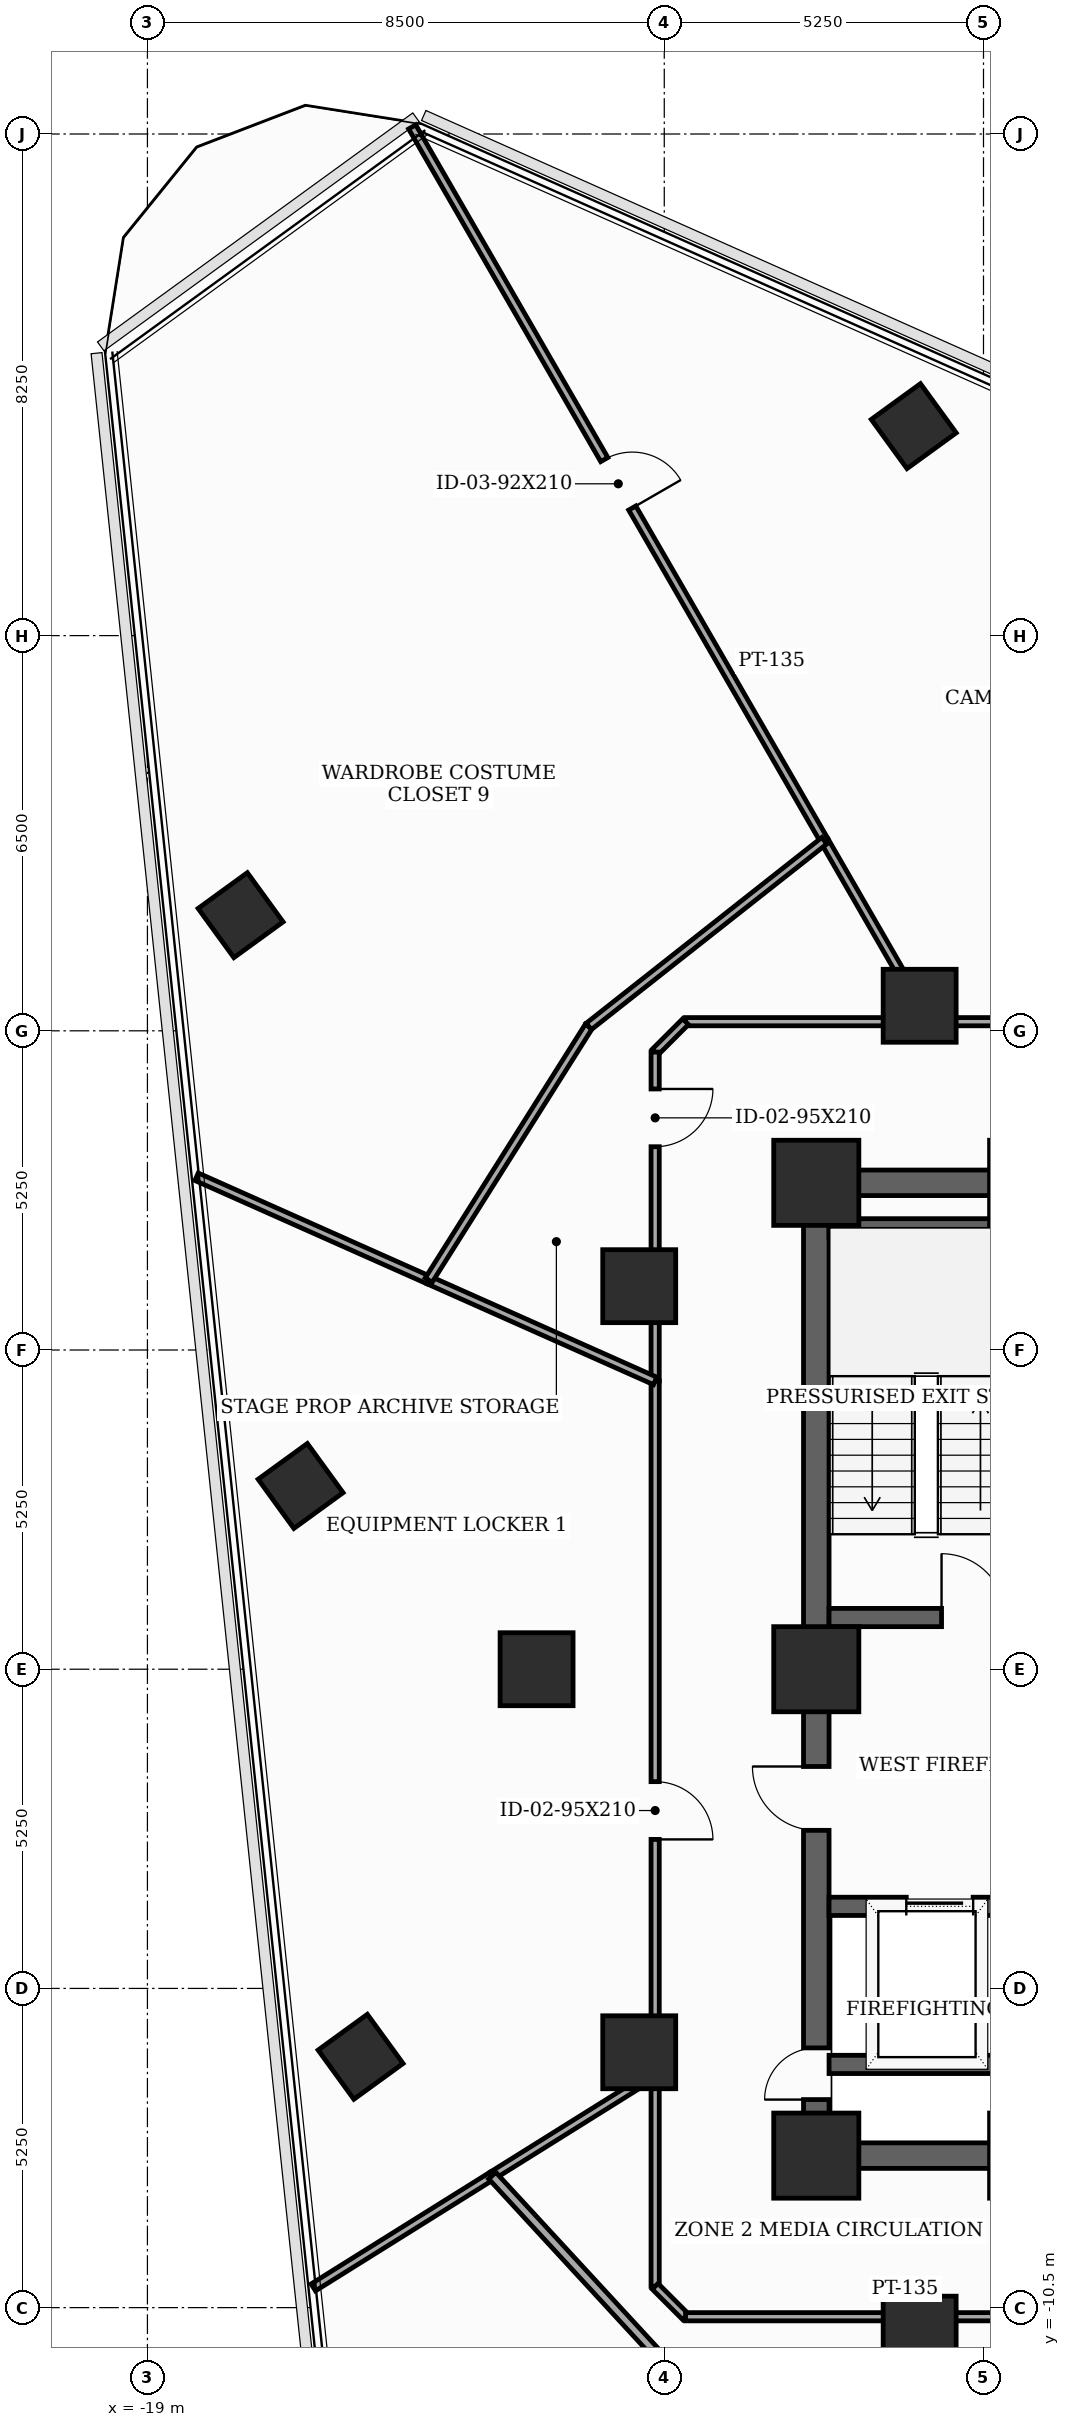
"""IFC4 building model, lengths in metres.
Left out: names, types, materials, properties, quantities, classifications, styles, units other than length and angle.
Written with IfcOpenShell. Run it as: python <this file> out.ifc"""

import sys

from ifc_helpers import new_model, si_unit, direction, frame, frame_2d, origin, origin_2d, place, context, subcontext, project, spatial, rectangle, extrude, element, fill, save


model = new_model("IFC4")
c1 = context("Model", 3, precision=1e-05, world=origin(), true_north=direction((0.0, 1.0)))
c2 = subcontext(c1, "Body", "Model", "MODEL_VIEW")
j1 = project(units=[si_unit("LENGTHUNIT", "METRE"), si_unit("PLANEANGLEUNIT", "RADIAN")], contexts=[c1])
p1 = place(None, origin())
s1 = spatial("IfcSite", under=j1, at=p1, CompositionType="ELEMENT")
p2 = place(p1, origin())
s2 = spatial("IfcBuilding", under=s1, at=p2, CompositionType="ELEMENT")
p3 = place(p2, frame((0.0, 0.0, 154.6)))
s3 = spatial("IfcBuildingStorey", under=s2, at=p3, CompositionType="ELEMENT", Elevation=154.6)
for number, where, z_axis, x_axis in (
    (1, (-8.0, -8.0, 0.0), (0.0, 0.0, 1.0), (1.0, 0.0, 0.0)),
    (2, (-4.45, -8.0, 0.0), (0.0, 0.0, 1.0), (1.0, 0.0, 0.0)),
    (3, (-4.45, 8.0, 0.0), (0.0, 0.0, 1.0), (1.0, 0.0, 0.0)),
    (4, (-8.0, 8.0, 0.0), (0.0, 0.0, 1.0), (1.0, 0.0, 0.0)),
    (5, (-8.0, 0.0, 0.0), (0.0, 0.0, 1.0), (1.0, 0.0, 0.0)),
):
    element("IfcColumn", number, at=place(p3, frame(where, z_axis=z_axis, x_axis=x_axis)), inside=s3, PredefinedType="COLUMN", context=c2, shape_type="SweptSolid", body=[
        extrude(rectangle(XDim=1.4, YDim=1.4, at=origin_2d()), origin(), (0.0, 0.0, 1.0), 3.7),
    ])
for number, where, z_axis, x_axis in (
    (6, (-6.3, 10.912, 0.0), (0.0, 0.0, 1.0), (1.0, 0.0, 0.0)),
    (7, (-10.912, 6.3, 0.0), (0.0, 0.0, 1.0), (1.0, 0.0, 0.0)),
    (8, (-12.6, 0.0, 0.0), (0.0, 0.0, 1.0), (1.0, 0.0, 0.0)),
    (9, (-10.912, -6.3, 0.0), (0.0, 0.0, 1.0), (1.0, 0.0, 0.0)),
    (10, (-6.3, -10.912, 0.0), (0.0, 0.0, 1.0), (1.0, 0.0, 0.0)),
):
    element("IfcColumn", number, at=place(p3, frame(where, z_axis=z_axis, x_axis=x_axis)), inside=s3, PredefinedType="COLUMN", context=c2, shape_type="SweptSolid", body=[
        extrude(rectangle(XDim=1.2, YDim=1.2, at=origin_2d()), origin(), (0.0, 0.0, 1.0), 3.7),
    ])
for number, where, z_axis, x_axis in (
    (11, (-6.397, 20.445, 0.0), (0.0, 0.0, 1.0), (0.809, 0.588, 0.0)),
    (12, (-17.468, 12.402, 0.0), (0.0, 0.0, 1.0), (0.809, 0.588, 0.0)),
    (13, (-16.481, 3.014, 0.0), (0.0, 0.0, 1.0), (0.809, 0.588, 0.0)),
    (14, (-15.494, -6.375, 0.0), (0.0, 0.0, 1.0), (0.809, 0.588, 0.0)),
):
    element("IfcColumn", number, at=place(p3, frame(where, z_axis=z_axis, x_axis=x_axis)), inside=s3, PredefinedType="COLUMN", context=c2, shape_type="SweptSolid", body=[
        extrude(rectangle(XDim=1.0, YDim=1.0, at=origin_2d()), origin(), (0.0, 0.0, 1.0), 3.7),
    ])
p4 = place(p3, frame((-8.0, -8.0, 0.0), z_axis=(0.0, 0.0, 1.0), x_axis=(0.0, 1.0, 0.0)))
e15 = element("IfcWall", 15, at=p4, inside=s3, PredefinedType="SHEAR", context=c2, shape_type="SweptSolid", body=[
    extrude(rectangle(XDim=16.0, YDim=0.42, at=frame_2d((8.0, 0.0))), origin(), (0.0, 0.0, 1.0), 3.5),
])
p5 = place(p4, frame((0.922, 0.0, 0.0)))
e16 = element("IfcOpeningElement", 16, at=p5, cuts=e15, PredefinedType="OPENING", context=c2, shape_type="SweptSolid", body=[
    extrude(rectangle(XDim=0.85, YDim=2.02, at=frame_2d((0.425, 1.01))), frame((0.0, 0.22, 0.0), z_axis=(0.0, -1.0, 0.0), x_axis=(1.0, 0.0, 0.0)), (0.0, 0.0, 1.0), 0.44),
])
p6 = place(p4, frame((5.35, 0.0, 0.0)))
e17 = element("IfcOpeningElement", 17, at=p6, cuts=e15, PredefinedType="OPENING", context=c2, shape_type="SweptSolid", body=[
    extrude(rectangle(XDim=1.05, YDim=2.15, at=frame_2d((0.525, 1.075))), frame((0.0, 0.22, 0.0), z_axis=(0.0, -1.0, 0.0), x_axis=(1.0, 0.0, 0.0)), (0.0, 0.0, 1.0), 0.44),
])
p7 = place(p3, frame((-8.0, -8.0, 0.0), z_axis=(0.0, 0.0, 1.0), x_axis=(1.0, 0.0, 0.0)))
e18 = element("IfcWall", 18, at=p7, inside=s3, PredefinedType="SHEAR", context=c2, shape_type="SweptSolid", body=[
    extrude(rectangle(XDim=16.0, YDim=0.42, at=frame_2d((8.0, 0.0))), origin(), (0.0, 0.0, 1.0), 3.5),
])
p8 = place(p7, frame((7.52, 0.0, 0.0)))
e19 = element("IfcOpeningElement", 19, at=p8, cuts=e18, PredefinedType="OPENING", context=c2, shape_type="SweptSolid", body=[
    extrude(rectangle(XDim=0.95, YDim=2.1, at=frame_2d((0.475, 1.05))), frame((0.0, 0.22, 0.0), z_axis=(0.0, -1.0, 0.0), x_axis=(1.0, 0.0, 0.0)), (0.0, 0.0, 1.0), 0.44),
])
p9 = place(p3, frame((-8.0, 8.0, 0.0), z_axis=(0.0, 0.0, 1.0), x_axis=(1.0, 0.0, 0.0)))
e20 = element("IfcWall", 20, at=p9, inside=s3, PredefinedType="SHEAR", context=c2, shape_type="SweptSolid", body=[
    extrude(rectangle(XDim=16.0, YDim=0.42, at=frame_2d((8.0, 0.0))), origin(), (0.0, 0.0, 1.0), 3.5),
])
p10 = place(p9, frame((7.1, 0.0, 0.0)))
e21 = element("IfcOpeningElement", 21, at=p10, cuts=e20, PredefinedType="OPENING", context=c2, shape_type="SweptSolid", body=[
    extrude(rectangle(XDim=1.8, YDim=2.15, at=frame_2d((0.9, 1.075))), frame((0.0, 0.22, 0.0), z_axis=(0.0, -1.0, 0.0), x_axis=(1.0, 0.0, 0.0)), (0.0, 0.0, 1.0), 0.44),
])
p11 = place(p3, frame((-7.79, 0.85, 0.0), z_axis=(0.0, 0.0, 1.0), x_axis=(1.0, 0.0, 0.0)))
e22 = element("IfcWall", 22, at=p11, inside=s3, PredefinedType="SHEAR", context=c2, shape_type="SweptSolid", body=[
    extrude(rectangle(XDim=3.34, YDim=0.3, at=frame_2d((1.67, 0.0))), origin(), (0.0, 0.0, 1.0), 3.5),
])
p12 = place(p11, frame((1.85, 0.0, 0.0)))
e23 = element("IfcOpeningElement", 23, at=p12, cuts=e22, PredefinedType="OPENING", context=c2, shape_type="SweptSolid", body=[
    extrude(rectangle(XDim=1.05, YDim=2.15, at=frame_2d((0.525, 1.075))), frame((0.0, 0.16, 0.0), z_axis=(0.0, -1.0, 0.0), x_axis=(1.0, 0.0, 0.0)), (0.0, 0.0, 1.0), 0.32),
])
p13 = place(p3, frame((-7.79, 7.26, 0.0), z_axis=(0.0, 0.0, 1.0), x_axis=(1.0, 0.0, 0.0)))
e24 = element("IfcWall", 24, at=p13, inside=s3, PredefinedType="SHEAR", context=c2, shape_type="SweptSolid", body=[
    extrude(rectangle(XDim=3.34, YDim=0.3, at=frame_2d((1.67, 0.0))), origin(), (0.0, 0.0, 1.0), 3.5),
])
p14 = place(p3, frame((-7.79, -3.9, 0.0), z_axis=(0.0, 0.0, 1.0), x_axis=(1.0, 0.0, 0.0)))
e25 = element("IfcWall", 25, at=p14, inside=s3, PredefinedType="SHEAR", context=c2, shape_type="SweptSolid", body=[
    extrude(rectangle(XDim=3.34, YDim=0.3, at=frame_2d((1.67, 0.0))), origin(), (0.0, 0.0, 1.0), 3.5),
])
p15 = place(p14, frame((1.27, 0.0, 0.0)))
e26 = element("IfcOpeningElement", 26, at=p15, cuts=e25, PredefinedType="OPENING", context=c2, shape_type="SweptSolid", body=[
    extrude(rectangle(XDim=1.1, YDim=2.1, at=frame_2d((0.55, 1.05))), frame((0.0, 0.16, 0.0), z_axis=(0.0, -1.0, 0.0), x_axis=(1.0, 0.0, 0.0)), (0.0, 0.0, 1.0), 0.32),
])
p16 = place(p3, frame((-7.79, -6.5, 0.0), z_axis=(0.0, 0.0, 1.0), x_axis=(1.0, 0.0, 0.0)))
e27 = element("IfcWall", 27, at=p16, inside=s3, PredefinedType="SHEAR", context=c2, shape_type="SweptSolid", body=[
    extrude(rectangle(XDim=3.34, YDim=0.3, at=frame_2d((1.67, 0.0))), origin(), (0.0, 0.0, 1.0), 3.5),
])
p17 = place(p3, frame((-10.65, 4.742, 0.0), z_axis=(0.0, 0.0, 1.0), x_axis=(0.0, -1.0, 0.0)))
e28 = element("IfcWall", 28, at=p17, inside=s3, PredefinedType="PARTITIONING", context=c2, shape_type="SweptSolid", body=[
    extrude(rectangle(XDim=11.397, YDim=0.135, at=frame_2d((5.698, 0.0))), origin(), (0.0, 0.0, 1.0), 2.885),
])
p18 = place(p17, frame((6.591, 0.0, 0.0)))
e29 = element("IfcOpeningElement", 29, at=p18, cuts=e28, PredefinedType="OPENING", context=c2, shape_type="SweptSolid", body=[
    extrude(rectangle(XDim=0.95, YDim=2.1, at=frame_2d((0.475, 1.05))), frame((0.0, 0.077, 0.0), z_axis=(0.0, -1.0, 0.0), x_axis=(1.0, 0.0, 0.0)), (0.0, 0.0, 1.0), 0.155),
])
p19 = place(p3, frame((-10.65, -6.655, 0.0), z_axis=(0.0, 0.0, 1.0), x_axis=(0.0, -1.0, 0.0)))
e30 = element("IfcWall", 30, at=p19, inside=s3, PredefinedType="PARTITIONING", context=c2, shape_type="SweptSolid", body=[
    extrude(rectangle(XDim=3.495, YDim=0.135, at=frame_2d((1.748, 0.0))), origin(), (0.0, 0.0, 1.0), 2.885),
])
p20 = place(p3, frame((-10.65, -10.15, 0.0), z_axis=(0.0, 0.0, 1.0), x_axis=(0.707106781187, -0.707106781187, 0.0)))
e31 = element("IfcWall", 31, at=p20, inside=s3, PredefinedType="PARTITIONING", context=c2, shape_type="SweptSolid", body=[
    extrude(rectangle(XDim=0.707, YDim=0.135, at=frame_2d((0.354, 0.0))), origin(), (0.0, 0.0, 1.0), 3.5),
])
p21 = place(p3, frame((-10.15, -10.65, 0.0), z_axis=(0.0, 0.0, 1.0), x_axis=(1.0, 0.0, 0.0)))
e32 = element("IfcWall", 32, at=p21, inside=s3, PredefinedType="PARTITIONING", context=c2, shape_type="SweptSolid", body=[
    extrude(rectangle(XDim=12.414, YDim=0.135, at=frame_2d((6.207, 0.0))), origin(), (0.0, 0.0, 1.0), 2.885),
])
p22 = place(p21, frame((7.222, 0.0, 0.0)))
e33 = element("IfcOpeningElement", 33, at=p22, cuts=e32, PredefinedType="OPENING", context=c2, shape_type="SweptSolid", body=[
    extrude(rectangle(XDim=0.95, YDim=2.1, at=frame_2d((0.475, 1.05))), frame((0.0, 0.077, 0.0), z_axis=(0.0, -1.0, 0.0), x_axis=(1.0, 0.0, 0.0)), (0.0, 0.0, 1.0), 0.155),
])
p23 = place(p3, frame((5.194, 10.65, 0.0), z_axis=(0.0, 0.0, 1.0), x_axis=(-1.0, 0.0, 0.0)))
e34 = element("IfcWall", 34, at=p23, inside=s3, PredefinedType="PARTITIONING", context=c2, shape_type="SweptSolid", body=[
    extrude(rectangle(XDim=11.343, YDim=0.135, at=frame_2d((5.671, 0.0))), origin(), (0.0, 0.0, 1.0), 2.885),
])
p24 = place(p23, frame((6.558, 0.0, 0.0)))
e35 = element("IfcOpeningElement", 35, at=p24, cuts=e34, PredefinedType="OPENING", context=c2, shape_type="SweptSolid", body=[
    extrude(rectangle(XDim=0.95, YDim=2.1, at=frame_2d((0.475, 1.05))), frame((0.0, 0.077, 0.0), z_axis=(0.0, -1.0, 0.0), x_axis=(1.0, 0.0, 0.0)), (0.0, 0.0, 1.0), 0.155),
])
p25 = place(p3, frame((-6.149, 10.65, 0.0), z_axis=(0.0, 0.0, 1.0), x_axis=(-1.0, 0.0, 0.0)))
e36 = element("IfcWall", 36, at=p25, inside=s3, PredefinedType="PARTITIONING", context=c2, shape_type="SweptSolid", body=[
    extrude(rectangle(XDim=4.001, YDim=0.135, at=frame_2d((2.0, 0.0))), origin(), (0.0, 0.0, 1.0), 2.885),
])
p26 = place(p3, frame((-10.15, 10.65, 0.0), z_axis=(0.0, 0.0, 1.0), x_axis=(-0.707106781187, -0.707106781187, 0.0)))
e37 = element("IfcWall", 37, at=p26, inside=s3, PredefinedType="PARTITIONING", context=c2, shape_type="SweptSolid", body=[
    extrude(rectangle(XDim=0.707, YDim=0.135, at=frame_2d((0.354, 0.0))), origin(), (0.0, 0.0, 1.0), 3.5),
])
p27 = place(p3, frame((-10.65, 10.15, 0.0), z_axis=(0.0, 0.0, 1.0), x_axis=(0.0, -1.0, 0.0)))
e38 = element("IfcWall", 38, at=p27, inside=s3, PredefinedType="PARTITIONING", context=c2, shape_type="SweptSolid", body=[
    extrude(rectangle(XDim=5.408, YDim=0.135, at=frame_2d((2.704, 0.0))), origin(), (0.0, 0.0, 1.0), 2.885),
])
p28 = place(p27, frame((0.607, 0.0, 0.0)))
e39 = element("IfcOpeningElement", 39, at=p28, cuts=e38, PredefinedType="OPENING", context=c2, shape_type="SweptSolid", body=[
    extrude(rectangle(XDim=0.95, YDim=2.1, at=frame_2d((0.475, 1.05))), frame((0.0, 0.077, 0.0), z_axis=(0.0, -1.0, 0.0), x_axis=(1.0, 0.0, 0.0)), (0.0, 0.0, 1.0), 0.155),
])
p29 = place(p3, frame((-16.272, -10.167, 0.0), z_axis=(0.0, 0.0, 1.0), x_axis=(0.848097115085, 0.529840809474, 0.0)))
e40 = element("IfcWall", 40, at=p29, inside=s3, PredefinedType="PARTITIONING", context=c2, shape_type="SweptSolid", body=[
    extrude(rectangle(XDim=3.47, YDim=0.135, at=frame_2d((1.735, 0.0))), origin(), (0.0, 0.0, 1.0), 2.985),
])
p30 = place(p3, frame((-13.329, -8.329, 0.0), z_axis=(0.0, 0.0, 1.0), x_axis=(0.848059079617, 0.529901686617, 0.0)))
e41 = element("IfcWall", 41, at=p30, inside=s3, PredefinedType="PARTITIONING", context=c2, shape_type="SweptSolid", body=[
    extrude(rectangle(XDim=3.159, YDim=0.135, at=frame_2d((1.58, 0.0))), origin(), (0.0, 0.0, 1.0), 2.885),
])
p31 = place(p3, frame((-14.374, 6.4, 0.0), z_axis=(0.0, 0.0, 1.0), x_axis=(-0.913556010805, 0.406712939457, 0.0)))
e42 = element("IfcWall", 42, at=p31, inside=s3, PredefinedType="PARTITIONING", context=c2, shape_type="SweptSolid", body=[
    extrude(rectangle(XDim=4.179, YDim=0.135, at=frame_2d((2.09, 0.0))), origin(), (0.0, 0.0, 1.0), 2.985),
])
p32 = place(p3, frame((-10.65, 4.742, 0.0), z_axis=(0.0, 0.0, 1.0), x_axis=(-0.913556992648, 0.406710734042, 0.0)))
e43 = element("IfcWall", 43, at=p32, inside=s3, PredefinedType="PARTITIONING", context=c2, shape_type="SweptSolid", body=[
    extrude(rectangle(XDim=4.076, YDim=0.135, at=frame_2d((2.038, 0.0))), origin(), (0.0, 0.0, 1.0), 2.885),
])
p33 = place(p3, frame((-9.1, -12.916, 0.0), z_axis=(0.0, 0.0, 1.0), x_axis=(-0.677841155448, 0.735208384052, 0.0)))
e44 = element("IfcWall", 44, at=p33, inside=s3, PredefinedType="PARTITIONING", context=c2, shape_type="SweptSolid", body=[
    extrude(rectangle(XDim=6.239, YDim=0.16, at=frame_2d((3.12, 0.0))), origin(), (0.0, 0.0, 1.0), 2.885),
])
p34 = place(p3, frame((-14.646, 25.367, 0.0), z_axis=(0.0, 0.0, 1.0), x_axis=(0.500047745944, -0.865997835896, 0.0)))
e45 = element("IfcWall", 45, at=p34, inside=s3, PredefinedType="PARTITIONING", context=c2, shape_type="SweptSolid", body=[
    extrude(rectangle(XDim=13.556, YDim=0.135, at=frame_2d((6.778, 0.0))), origin(), (0.0, 0.0, 1.0), 2.985),
])
p35 = place(p34, frame((6.318, 0.0, 0.0)))
e46 = element("IfcOpeningElement", 46, at=p35, cuts=e45, PredefinedType="OPENING", context=c2, shape_type="SweptSolid", body=[
    extrude(rectangle(XDim=0.92, YDim=2.1, at=frame_2d((0.46, 1.05))), frame((0.0, 0.077, 0.0), z_axis=(0.0, -1.0, 0.0), x_axis=(1.0, 0.0, 0.0)), (0.0, 0.0, 1.0), 0.155),
])
p36 = place(p3, frame((-7.867, 13.627, 0.0), z_axis=(0.0, 0.0, 1.0), x_axis=(0.499829032188, -0.866124089598, 0.0)))
e47 = element("IfcWall", 47, at=p36, inside=s3, PredefinedType="PARTITIONING", context=c2, shape_type="SweptSolid", body=[
    extrude(rectangle(XDim=3.437, YDim=0.135, at=frame_2d((1.719, 0.0))), origin(), (0.0, 0.0, 1.0), 2.885),
])
p37 = place(p3, frame((-14.374, 6.4, 0.0), z_axis=(0.0, 0.0, 1.0), x_axis=(0.53356651363, 0.845758106986, 0.0)))
e48 = element("IfcWall", 48, at=p37, inside=s3, PredefinedType="PARTITIONING", context=c2, shape_type="SweptSolid", body=[
    extrude(rectangle(XDim=4.933, YDim=0.135, at=frame_2d((2.467, 0.0))), origin(), (0.0, 0.0, 1.0), 2.885),
])
p38 = place(p3, frame((-11.742, 10.572, 0.0), z_axis=(0.0, 0.0, 1.0), x_axis=(0.785304323173, 0.619109941776, 0.0)))
e49 = element("IfcWall", 49, at=p38, inside=s3, PredefinedType="PARTITIONING", context=c2, shape_type="SweptSolid", body=[
    extrude(rectangle(XDim=4.934, YDim=0.135, at=frame_2d((2.467, 0.0))), origin(), (0.0, 0.0, 1.0), 3.5),
])
p39 = place(p5, origin())
e50 = element("IfcDoor", 50, at=p39, inside=s3, OperationType="SINGLE_SWING_LEFT", PredefinedType="TRAPDOOR", context=c2, shape_type="SweptSolid", body=[
    extrude(rectangle(XDim=0.85, YDim=2.02, at=frame_2d((0.425, 1.01))), frame((0.0, 0.025, 0.0), z_axis=(0.0, -1.0, 0.0), x_axis=(1.0, 0.0, 0.0)), (0.0, 0.0, 1.0), 0.05),
])
fill(e16, e50)
p40 = place(p6, origin())
e51 = element("IfcDoor", 51, at=p40, inside=s3, OperationType="SINGLE_SWING_RIGHT", PredefinedType="DOOR", context=c2, shape_type="SweptSolid", body=[
    extrude(rectangle(XDim=1.05, YDim=2.15, at=frame_2d((0.525, 1.075))), frame((0.0, 0.025, 0.0), z_axis=(0.0, -1.0, 0.0), x_axis=(1.0, 0.0, 0.0)), (0.0, 0.0, 1.0), 0.05),
])
fill(e17, e51)
p41 = place(p12, origin())
e52 = element("IfcDoor", 52, at=p41, inside=s3, OperationType="SINGLE_SWING_LEFT", PredefinedType="DOOR", context=c2, shape_type="SweptSolid", body=[
    extrude(rectangle(XDim=1.05, YDim=2.15, at=frame_2d((0.525, 1.075))), frame((0.0, 0.025, 0.0), z_axis=(0.0, -1.0, 0.0), x_axis=(1.0, 0.0, 0.0)), (0.0, 0.0, 1.0), 0.05),
])
fill(e23, e52)
p42 = place(p15, origin())
e53 = element("IfcDoor", 53, at=p42, inside=s3, OperationType="SLIDING_TO_LEFT", PredefinedType="DOOR", context=c2, shape_type="SweptSolid", body=[
    extrude(rectangle(XDim=1.1, YDim=2.1, at=frame_2d((0.55, 1.05))), frame((0.0, 0.025, 0.0), z_axis=(0.0, -1.0, 0.0), x_axis=(1.0, 0.0, 0.0)), (0.0, 0.0, 1.0), 0.05),
])
fill(e26, e53)
p43 = place(p18, origin())
e54 = element("IfcDoor", 54, at=p43, inside=s3, OperationType="SINGLE_SWING_RIGHT", PredefinedType="DOOR", context=c2, shape_type="SweptSolid", body=[
    extrude(rectangle(XDim=0.95, YDim=2.1, at=frame_2d((0.475, 1.05))), frame((0.0, 0.025, 0.0), z_axis=(0.0, -1.0, 0.0), x_axis=(1.0, 0.0, 0.0)), (0.0, 0.0, 1.0), 0.05),
])
fill(e29, e54)
p44 = place(p28, origin())
e55 = element("IfcDoor", 55, at=p44, inside=s3, OperationType="SINGLE_SWING_LEFT", PredefinedType="DOOR", context=c2, shape_type="SweptSolid", body=[
    extrude(rectangle(XDim=0.95, YDim=2.1, at=frame_2d((0.475, 1.05))), frame((0.0, 0.025, 0.0), z_axis=(0.0, -1.0, 0.0), x_axis=(1.0, 0.0, 0.0)), (0.0, 0.0, 1.0), 0.05),
])
fill(e39, e55)
p45 = place(p35, origin())
e56 = element("IfcDoor", 56, at=p45, inside=s3, OperationType="SINGLE_SWING_RIGHT", PredefinedType="DOOR", context=c2, shape_type="SweptSolid", body=[
    extrude(rectangle(XDim=0.92, YDim=2.1, at=frame_2d((0.46, 1.05))), frame((0.0, 0.025, 0.0), z_axis=(0.0, -1.0, 0.0), x_axis=(1.0, 0.0, 0.0)), (0.0, 0.0, 1.0), 0.05),
])
fill(e46, e56)
save(model, sys.argv[1])
